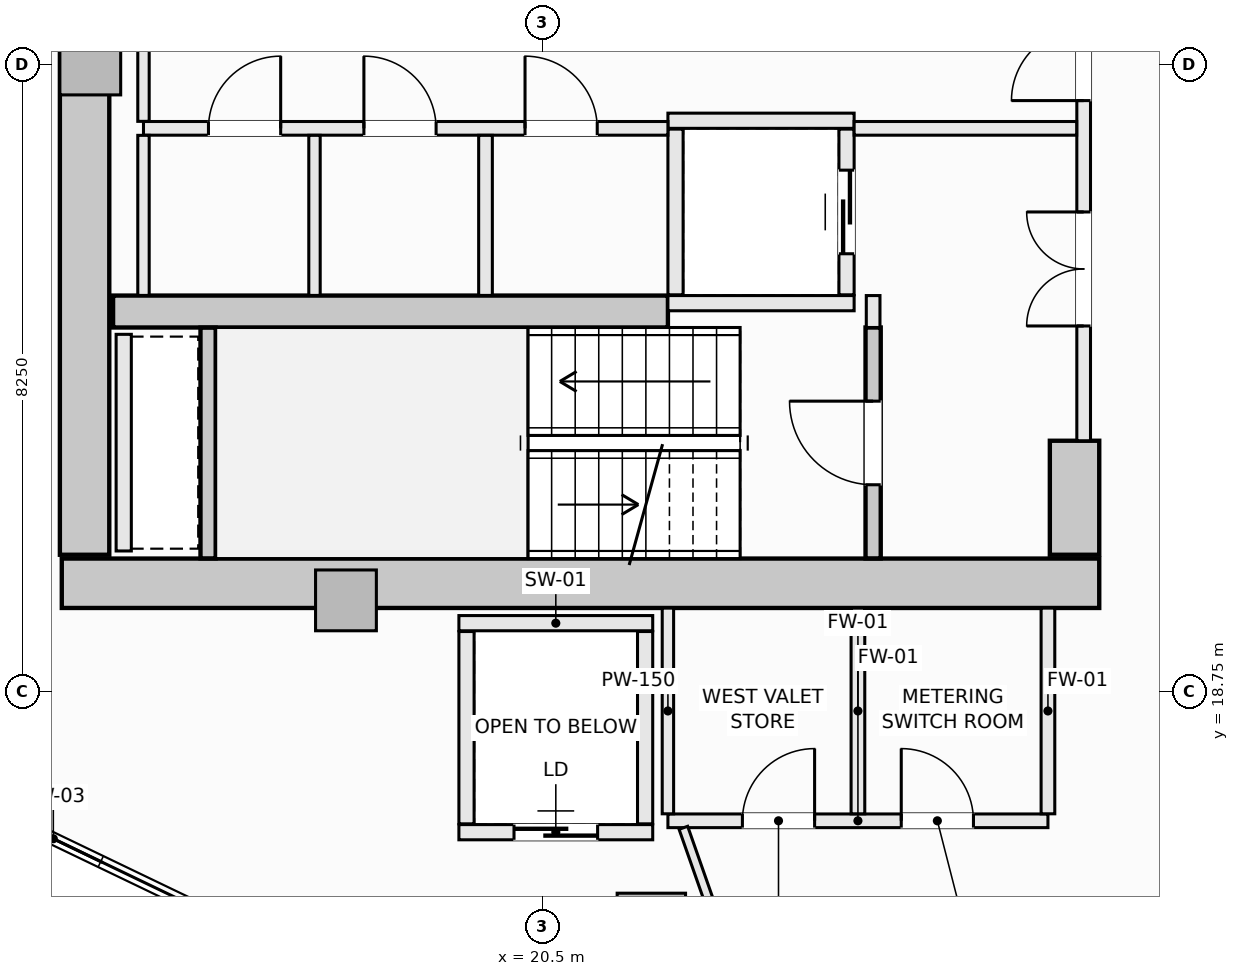
"""IFC4 building model, lengths in metres.
Left out: names, types, materials, properties, quantities, classifications, styles, units other than length and angle.
Written with IfcOpenShell. Run it as: python <this file> out.ifc"""

import sys

from ifc_helpers import new_model, si_unit, direction, frame, frame_2d, origin, origin_2d, place, context, subcontext, project, spatial, rectangle, extrude, element, fill, save


model = new_model("IFC4")
c1 = context("Model", 3, precision=1e-05, world=origin(), true_north=direction((0.0, 1.0)))
c2 = subcontext(c1, "Body", "Model", "MODEL_VIEW")
j1 = project(units=[si_unit("LENGTHUNIT", "METRE"), si_unit("PLANEANGLEUNIT", "RADIAN")], contexts=[c1])
p1 = place(None, origin())
s1 = spatial("IfcSite", under=j1, at=p1, CompositionType="ELEMENT")
p2 = place(p1, origin())
s2 = spatial("IfcBuilding", under=s1, at=p2, CompositionType="ELEMENT")
p3 = place(p2, frame((0.0, 0.0, 156.3)))
s3 = spatial("IfcBuildingStorey", under=s2, at=p3, CompositionType="ELEMENT", Elevation=156.3)
p4 = place(p3, frame((14.175, 20.175, -0.27), z_axis=(0.0, 0.0, 1.0), x_axis=(1.0, 0.0, 0.0)))
e1 = element("IfcWall", 1, at=p4, inside=s3, PredefinedType="SHEAR", context=c2, shape_type="SweptSolid", body=[
    extrude(rectangle(XDim=13.65, YDim=0.65, at=frame_2d((6.825, 0.0))), origin(), (0.0, 0.0, 1.0), 3.4),
])
p5 = place(p3, frame((14.475, 20.55, -0.27), z_axis=(0.0, 0.0, 1.0), x_axis=(0.0, 1.0, 0.0)))
e2 = element("IfcWall", 2, at=p5, inside=s3, PredefinedType="SHEAR", context=c2, shape_type="SweptSolid", body=[
    extrude(rectangle(XDim=12.9, YDim=0.65, at=frame_2d((6.45, 0.0))), origin(), (0.0, 0.0, 1.0), 3.4),
])
p6 = place(p3, frame((27.5, 20.55, -0.27), z_axis=(0.0, 0.0, 1.0), x_axis=(0.0, 1.0, 0.0)))
e3 = element("IfcWall", 3, at=p6, inside=s3, PredefinedType="SHEAR", context=c2, shape_type="SweptSolid", body=[
    extrude(rectangle(XDim=1.5, YDim=0.65, at=frame_2d((0.75, 0.0))), origin(), (0.0, 0.0, 1.0), 3.4),
])
p7 = place(p3, frame((14.85, 23.75, -0.27), z_axis=(0.0, 0.0, 1.0), x_axis=(1.0, 0.0, 0.0)))
e4 = element("IfcWall", 4, at=p7, inside=s3, PredefinedType="SHEAR", context=c2, shape_type="SweptSolid", body=[
    extrude(rectangle(XDim=7.3, YDim=0.42, at=frame_2d((3.65, 0.0))), origin(), (0.0, 0.0, 1.0), 3.4),
])
p8 = place(p3, frame((21.932, 15.648, -0.27), z_axis=(0.0, 0.0, 1.0), x_axis=(1.0, 0.0, 0.0)))
e5 = element("IfcColumn", 5, at=p8, inside=s3, PredefinedType="COLUMN", context=c2, shape_type="SweptSolid", body=[
    extrude(rectangle(XDim=0.9, YDim=0.9, at=origin_2d()), origin(), (0.0, 0.0, 1.0), 3.4),
])
for number, where, z_axis, x_axis in (
    (6, (14.55, 27.0, -0.27), (0.0, 0.0, 1.0), (1.0, 0.0, 0.0)),
    (7, (17.914, 19.95, -0.27), (0.0, 0.0, 1.0), (1.0, 0.0, 0.0)),
):
    element("IfcColumn", number, at=place(p3, frame(where, z_axis=z_axis, x_axis=x_axis)), inside=s3, PredefinedType="PILASTER", context=c2, shape_type="SweptSolid", body=[
        extrude(rectangle(XDim=0.8, YDim=0.8, at=origin_2d()), origin(), (0.0, 0.0, 1.0), 3.4),
    ])
p9 = place(p3, frame((24.85, 20.502, -0.27), z_axis=(0.0, 0.0, 1.0), x_axis=(0.0, 1.0, 0.0)))
e8 = element("IfcWall", 8, at=p9, inside=s3, PredefinedType="SHEAR", context=c2, shape_type="SweptSolid", body=[
    extrude(rectangle(XDim=3.038, YDim=0.2, at=frame_2d((1.519, 0.0))), origin(), (0.0, 0.0, 1.0), 3.4),
])
p10 = place(p9, frame((0.969, 0.0, 0.27)))
e9 = element("IfcOpeningElement", 9, at=p10, cuts=e8, PredefinedType="OPENING", context=c2, shape_type="SweptSolid", body=[
    extrude(rectangle(XDim=1.1, YDim=2.15, at=frame_2d((0.55, 1.075))), frame((0.0, 0.11, 0.0), z_axis=(0.0, -1.0, 0.0), x_axis=(1.0, 0.0, 0.0)), (0.0, 0.0, 1.0), 0.22),
])
p11 = place(p3, frame((16.1, 20.502, -0.27), z_axis=(0.0, 0.0, 1.0), x_axis=(0.0, 1.0, 0.0)))
e10 = element("IfcWall", 10, at=p11, inside=s3, PredefinedType="SHEAR", context=c2, shape_type="SweptSolid", body=[
    extrude(rectangle(XDim=3.036, YDim=0.2, at=frame_2d((1.518, 0.0))), origin(), (0.0, 0.0, 1.0), 3.4),
])
for number, where, z_axis, x_axis in (
    (11, (22.15, 26.26, 0.0), (0.0, 0.0, 1.0), (1.0, 0.0, 0.0)),
    (12, (22.15, 23.86, 0.0), (0.0, 0.0, 1.0), (1.0, 0.0, 0.0)),
):
    element("IfcWall", number, at=place(p3, frame(where, z_axis=z_axis, x_axis=x_axis)), inside=s3, PredefinedType="SOLIDWALL", context=c2, shape_type="SweptSolid", body=[
        extrude(rectangle(XDim=2.45, YDim=0.2, at=frame_2d((1.225, 0.0))), origin(), (0.0, 0.0, 1.0), 3.13),
    ])
p12 = place(p3, frame((22.25, 23.97, 0.0), z_axis=(0.0, 0.0, 1.0), x_axis=(0.0, 1.0, 0.0)))
e13 = element("IfcWall", 13, at=p12, inside=s3, PredefinedType="SOLIDWALL", context=c2, shape_type="SweptSolid", body=[
    extrude(rectangle(XDim=2.18, YDim=0.2, at=frame_2d((1.09, 0.0))), origin(), (0.0, 0.0, 1.0), 3.13),
])
p13 = place(p3, frame((24.5, 23.97, 0.0), z_axis=(0.0, 0.0, 1.0), x_axis=(0.0, 1.0, 0.0)))
e14 = element("IfcWall", 14, at=p13, inside=s3, PredefinedType="SOLIDWALL", context=c2, shape_type="SweptSolid", body=[
    extrude(rectangle(XDim=2.18, YDim=0.2, at=frame_2d((1.09, 0.0))), origin(), (0.0, 0.0, 1.0), 3.13),
])
p14 = place(p13, frame((0.54, 0.0, 0.0)))
e15 = element("IfcOpeningElement", 15, at=p14, cuts=e14, PredefinedType="OPENING", context=c2, shape_type="SweptSolid", body=[
    extrude(rectangle(XDim=1.1, YDim=2.2, at=frame_2d((0.55, 1.1))), frame((0.0, 0.11, 0.0), z_axis=(0.0, -1.0, 0.0), x_axis=(1.0, 0.0, 0.0)), (0.0, 0.0, 1.0), 0.22),
])
p15 = place(p3, frame((19.4, 19.65, 0.0), z_axis=(0.0, 0.0, 1.0), x_axis=(1.0, 0.0, 0.0)))
e16 = element("IfcWall", 16, at=p15, inside=s3, PredefinedType="SOLIDWALL", context=c2, shape_type="SweptSolid", body=[
    extrude(rectangle(XDim=2.55, YDim=0.2, at=frame_2d((1.275, 0.0))), origin(), (0.0, 0.0, 1.0), 3.13),
])
p16 = place(p3, frame((19.4, 16.9, 0.0), z_axis=(0.0, 0.0, 1.0), x_axis=(1.0, 0.0, 0.0)))
e17 = element("IfcWall", 17, at=p16, inside=s3, PredefinedType="SOLIDWALL", context=c2, shape_type="SweptSolid", body=[
    extrude(rectangle(XDim=2.55, YDim=0.2, at=frame_2d((1.275, 0.0))), origin(), (0.0, 0.0, 1.0), 3.13),
])
p17 = place(p16, frame((0.725, 0.0, 0.0)))
e18 = element("IfcOpeningElement", 18, at=p17, cuts=e17, PredefinedType="OPENING", context=c2, shape_type="SweptSolid", body=[
    extrude(rectangle(XDim=1.1, YDim=2.2, at=frame_2d((0.55, 1.1))), frame((0.0, 0.11, 0.0), z_axis=(0.0, -1.0, 0.0), x_axis=(1.0, 0.0, 0.0)), (0.0, 0.0, 1.0), 0.22),
])
for number, where, z_axis, x_axis in (
    (19, (19.5, 17.01, 0.0), (0.0, 0.0, 1.0), (0.0, 1.0, 0.0)),
    (20, (21.85, 17.01, 0.0), (0.0, 0.0, 1.0), (0.0, 1.0, 0.0)),
):
    element("IfcWall", number, at=place(p3, frame(where, z_axis=z_axis, x_axis=x_axis)), inside=s3, PredefinedType="SOLIDWALL", context=c2, shape_type="SweptSolid", body=[
        extrude(rectangle(XDim=2.53, YDim=0.2, at=frame_2d((1.265, 0.0))), origin(), (0.0, 0.0, 1.0), 3.13),
    ])
p18 = place(p3, frame((14.99, 20.6, 0.0), z_axis=(0.0, 0.0, 1.0), x_axis=(0.0, 1.0, 0.0)))
e21 = element("IfcWall", 21, at=p18, inside=s3, PredefinedType="SOLIDWALL", context=c2, shape_type="SweptSolid", body=[
    extrude(rectangle(XDim=2.85, YDim=0.2, at=frame_2d((1.425, 0.0))), origin(), (0.0, 0.0, 1.0), 3.13),
])
p19 = place(p3, frame((24.85, 23.54, 0.0), z_axis=(0.0, 0.0, 1.0), x_axis=(0.0, 1.0, 0.0)))
e22 = element("IfcWall", 22, at=p19, inside=s3, PredefinedType="SOLIDWALL", context=c2, shape_type="SweptSolid", body=[
    extrude(rectangle(XDim=0.42, YDim=0.18, at=frame_2d((0.21, 0.0))), origin(), (0.0, 0.0, 1.0), 3.13),
])
p20 = place(p3, frame((27.62, 22.05, 0.0), z_axis=(0.0, 0.0, 1.0), x_axis=(0.0, 1.0, 0.0)))
e23 = element("IfcWall", 23, at=p20, inside=s3, PredefinedType="SOLIDWALL", context=c2, shape_type="SweptSolid", body=[
    extrude(rectangle(XDim=9.9, YDim=0.18, at=frame_2d((4.95, 0.0))), origin(), (0.0, 0.0, 1.0), 3.13),
])
p21 = place(p20, frame((4.475, 0.0, 0.0)))
e24 = element("IfcOpeningElement", 24, at=p21, cuts=e23, PredefinedType="OPENING", context=c2, shape_type="SweptSolid", body=[
    extrude(rectangle(XDim=0.95, YDim=2.1, at=frame_2d((0.475, 1.05))), frame((0.0, 0.1, 0.0), z_axis=(0.0, -1.0, 0.0), x_axis=(1.0, 0.0, 0.0)), (0.0, 0.0, 1.0), 0.2),
])
p22 = place(p20, frame((6.89, 0.0, 0.0)))
e25 = element("IfcOpeningElement", 25, at=p22, cuts=e23, PredefinedType="OPENING", context=c2, shape_type="SweptSolid", body=[
    extrude(rectangle(XDim=1.5, YDim=2.2, at=frame_2d((0.75, 1.1))), frame((0.0, 0.1, 0.0), z_axis=(0.0, -1.0, 0.0), x_axis=(1.0, 0.0, 0.0)), (0.0, 0.0, 1.0), 0.2),
])
p23 = place(p20, frame((1.51, 0.0, 0.0)))
e26 = element("IfcOpeningElement", 26, at=p23, cuts=e23, PredefinedType="OPENING", context=c2, shape_type="SweptSolid", body=[
    extrude(rectangle(XDim=1.5, YDim=2.2, at=frame_2d((0.75, 1.1))), frame((0.0, 0.1, 0.0), z_axis=(0.0, -1.0, 0.0), x_axis=(1.0, 0.0, 0.0)), (0.0, 0.0, 1.0), 0.2),
])
p24 = place(p3, frame((15.25, 26.16, 0.0), z_axis=(0.0, 0.0, 1.0), x_axis=(1.0, 0.0, 0.0)))
e27 = element("IfcWall", 27, at=p24, inside=s3, PredefinedType="SOLIDWALL", context=c2, shape_type="SweptSolid", body=[
    extrude(rectangle(XDim=6.9, YDim=0.18, at=frame_2d((3.45, 0.0))), origin(), (0.0, 0.0, 1.0), 3.13),
])
p25 = place(p24, frame((5.02, 0.0, 0.0)))
e28 = element("IfcOpeningElement", 28, at=p25, cuts=e27, PredefinedType="OPENING", context=c2, shape_type="SweptSolid", body=[
    extrude(rectangle(XDim=0.95, YDim=2.1, at=frame_2d((0.475, 1.05))), frame((0.0, 0.1, 0.0), z_axis=(0.0, -1.0, 0.0), x_axis=(1.0, 0.0, 0.0)), (0.0, 0.0, 1.0), 0.2),
])
p26 = place(p24, frame((0.855, 0.0, 0.0)))
e29 = element("IfcOpeningElement", 29, at=p26, cuts=e27, PredefinedType="OPENING", context=c2, shape_type="SweptSolid", body=[
    extrude(rectangle(XDim=0.95, YDim=2.1, at=frame_2d((0.475, 1.05))), frame((0.0, 0.1, 0.0), z_axis=(0.0, -1.0, 0.0), x_axis=(1.0, 0.0, 0.0)), (0.0, 0.0, 1.0), 0.2),
])
p27 = place(p24, frame((2.9, 0.0, 0.0)))
e30 = element("IfcOpeningElement", 30, at=p27, cuts=e27, PredefinedType="OPENING", context=c2, shape_type="SweptSolid", body=[
    extrude(rectangle(XDim=0.95, YDim=2.1, at=frame_2d((0.475, 1.05))), frame((0.0, 0.1, 0.0), z_axis=(0.0, -1.0, 0.0), x_axis=(1.0, 0.0, 0.0)), (0.0, 0.0, 1.0), 0.2),
])
p28 = place(p3, frame((24.6, 26.16, 0.0), z_axis=(0.0, 0.0, 1.0), x_axis=(1.0, 0.0, 0.0)))
e31 = element("IfcWall", 31, at=p28, inside=s3, PredefinedType="SOLIDWALL", context=c2, shape_type="SweptSolid", body=[
    extrude(rectangle(XDim=2.928, YDim=0.18, at=frame_2d((1.464, 0.0))), origin(), (0.0, 0.0, 1.0), 3.13),
])
p29 = place(p3, frame((15.25, 23.962, 0.0), z_axis=(0.0, 0.0, 1.0), x_axis=(0.0, 1.0, 0.0)))
e32 = element("IfcWall", 32, at=p29, inside=s3, PredefinedType="PARTITIONING", context=c2, shape_type="SweptSolid", body=[
    extrude(rectangle(XDim=2.106, YDim=0.15, at=frame_2d((1.053, 0.0))), origin(), (0.0, 0.0, 1.0), 3.13),
])
p30 = place(p3, frame((15.25, 26.252, 0.0), z_axis=(0.0, 0.0, 1.0), x_axis=(0.0, 1.0, 0.0)))
e33 = element("IfcWall", 33, at=p30, inside=s3, PredefinedType="PARTITIONING", context=c2, shape_type="SweptSolid", body=[
    extrude(rectangle(XDim=1.496, YDim=0.15, at=frame_2d((0.748, 0.0))), origin(), (0.0, 0.0, 1.0), 3.13),
])
p31 = place(p3, frame((19.75, 23.962, 0.0), z_axis=(0.0, 0.0, 1.0), x_axis=(0.0, 1.0, 0.0)))
e34 = element("IfcWall", 34, at=p31, inside=s3, PredefinedType="SOLIDWALL", context=c2, shape_type="SweptSolid", body=[
    extrude(rectangle(XDim=2.106, YDim=0.18, at=frame_2d((1.053, 0.0))), origin(), (0.0, 0.0, 1.0), 3.13),
])
p32 = place(p3, frame((17.5, 23.962, 0.0), z_axis=(0.0, 0.0, 1.0), x_axis=(0.0, 1.0, 0.0)))
e35 = element("IfcWall", 35, at=p32, inside=s3, PredefinedType="PARTITIONING", context=c2, shape_type="SweptSolid", body=[
    extrude(rectangle(XDim=2.106, YDim=0.15, at=frame_2d((1.053, 0.0))), origin(), (0.0, 0.0, 1.0), 3.13),
])
p33 = place(p3, frame((22.15, 17.05, 0.0), z_axis=(0.0, 0.0, 1.0), x_axis=(1.0, 0.0, 0.0)))
e36 = element("IfcWall", 36, at=p33, inside=s3, PredefinedType="SOLIDWALL", context=c2, shape_type="SweptSolid", body=[
    extrude(rectangle(XDim=5.0, YDim=0.18, at=frame_2d((2.5, 0.0))), origin(), (0.0, 0.0, 1.0), 3.13),
])
p34 = place(p33, frame((0.98, 0.0, 0.0)))
e37 = element("IfcOpeningElement", 37, at=p34, cuts=e36, PredefinedType="OPENING", context=c2, shape_type="SweptSolid", body=[
    extrude(rectangle(XDim=0.95, YDim=2.1, at=frame_2d((0.475, 1.05))), frame((0.0, 0.1, 0.0), z_axis=(0.0, -1.0, 0.0), x_axis=(1.0, 0.0, 0.0)), (0.0, 0.0, 1.0), 0.2),
])
p35 = place(p33, frame((3.07, 0.0, 0.0)))
e38 = element("IfcOpeningElement", 38, at=p35, cuts=e36, PredefinedType="OPENING", context=c2, shape_type="SweptSolid", body=[
    extrude(rectangle(XDim=0.95, YDim=2.1, at=frame_2d((0.475, 1.05))), frame((0.0, 0.1, 0.0), z_axis=(0.0, -1.0, 0.0), x_axis=(1.0, 0.0, 0.0)), (0.0, 0.0, 1.0), 0.2),
])
p36 = place(p3, frame((22.15, 17.142, 0.0), z_axis=(0.0, 0.0, 1.0), x_axis=(0.0, 1.0, 0.0)))
e39 = element("IfcWall", 39, at=p36, inside=s3, PredefinedType="PARTITIONING", context=c2, shape_type="SweptSolid", body=[
    extrude(rectangle(XDim=2.706, YDim=0.15, at=frame_2d((1.353, 0.0))), origin(), (0.0, 0.0, 1.0), 3.13),
])
for number, where, z_axis, x_axis in (
    (40, (24.65, 17.142, 0.0), (0.0, 0.0, 1.0), (0.0, 1.0, 0.0)),
    (41, (27.15, 17.142, 0.0), (0.0, 0.0, 1.0), (0.0, 1.0, 0.0)),
):
    element("IfcWall", number, at=place(p3, frame(where, z_axis=z_axis, x_axis=x_axis)), inside=s3, PredefinedType="SOLIDWALL", context=c2, shape_type="SweptSolid", body=[
        extrude(rectangle(XDim=2.706, YDim=0.18, at=frame_2d((1.353, 0.0))), origin(), (0.0, 0.0, 1.0), 3.13),
    ])
p37 = place(p3, frame((22.353, 16.958, 0.0), z_axis=(0.0, 0.0, 1.0), x_axis=(0.331370038458, -0.943500873138, 0.0)))
e42 = element("IfcWall", 42, at=p37, inside=s3, PredefinedType="PARTITIONING", context=c2, shape_type="SweptSolid", body=[
    extrude(rectangle(XDim=1.216, YDim=0.12, at=frame_2d((0.608, 0.0))), origin(), (0.0, 0.0, 1.0), 3.13),
])
p38 = place(p10, origin())
e43 = element("IfcDoor", 43, at=p38, inside=s3, OperationType="SINGLE_SWING_RIGHT", PredefinedType="DOOR", context=c2, shape_type="SweptSolid", body=[
    extrude(rectangle(XDim=1.1, YDim=2.15, at=frame_2d((0.55, 1.075))), frame((0.0, 0.025, 0.0), z_axis=(0.0, -1.0, 0.0), x_axis=(1.0, 0.0, 0.0)), (0.0, 0.0, 1.0), 0.05),
])
fill(e9, e43)
p39 = place(p14, origin())
e44 = element("IfcDoor", 44, at=p39, inside=s3, OperationType="SLIDING_TO_LEFT", PredefinedType="DOOR", context=c2, shape_type="SweptSolid", body=[
    extrude(rectangle(XDim=1.1, YDim=2.2, at=frame_2d((0.55, 1.1))), frame((0.0, 0.025, 0.0), z_axis=(0.0, -1.0, 0.0), x_axis=(1.0, 0.0, 0.0)), (0.0, 0.0, 1.0), 0.05),
])
fill(e15, e44)
p40 = place(p17, origin())
e45 = element("IfcDoor", 45, at=p40, inside=s3, OperationType="SLIDING_TO_LEFT", PredefinedType="DOOR", context=c2, shape_type="SweptSolid", body=[
    extrude(rectangle(XDim=1.1, YDim=2.2, at=frame_2d((0.55, 1.1))), frame((0.0, 0.025, 0.0), z_axis=(0.0, -1.0, 0.0), x_axis=(1.0, 0.0, 0.0)), (0.0, 0.0, 1.0), 0.05),
])
fill(e18, e45)
p41 = place(p21, origin())
e46 = element("IfcDoor", 46, at=p41, inside=s3, OperationType="SINGLE_SWING_LEFT", PredefinedType="DOOR", context=c2, shape_type="SweptSolid", body=[
    extrude(rectangle(XDim=0.95, YDim=2.1, at=frame_2d((0.475, 1.05))), frame((0.0, 0.025, 0.0), z_axis=(0.0, -1.0, 0.0), x_axis=(1.0, 0.0, 0.0)), (0.0, 0.0, 1.0), 0.05),
])
fill(e24, e46)
p42 = place(p23, origin())
e47 = element("IfcDoor", 47, at=p42, inside=s3, OperationType="DOUBLE_DOOR_SINGLE_SWING", PredefinedType="DOOR", context=c2, shape_type="SweptSolid", body=[
    extrude(rectangle(XDim=1.5, YDim=2.2, at=frame_2d((0.75, 1.1))), frame((0.0, 0.025, 0.0), z_axis=(0.0, -1.0, 0.0), x_axis=(1.0, 0.0, 0.0)), (0.0, 0.0, 1.0), 0.05),
])
fill(e26, e47)
p43 = place(p25, origin())
e48 = element("IfcDoor", 48, at=p43, inside=s3, OperationType="SINGLE_SWING_LEFT", PredefinedType="DOOR", context=c2, shape_type="SweptSolid", body=[
    extrude(rectangle(XDim=0.95, YDim=2.1, at=frame_2d((0.475, 1.05))), frame((0.0, 0.025, 0.0), z_axis=(0.0, -1.0, 0.0), x_axis=(1.0, 0.0, 0.0)), (0.0, 0.0, 1.0), 0.05),
])
fill(e28, e48)
p44 = place(p26, origin())
e49 = element("IfcDoor", 49, at=p44, inside=s3, OperationType="SINGLE_SWING_RIGHT", PredefinedType="DOOR", context=c2, shape_type="SweptSolid", body=[
    extrude(rectangle(XDim=0.95, YDim=2.1, at=frame_2d((0.475, 1.05))), frame((0.0, 0.025, 0.0), z_axis=(0.0, -1.0, 0.0), x_axis=(1.0, 0.0, 0.0)), (0.0, 0.0, 1.0), 0.05),
])
fill(e29, e49)
p45 = place(p27, origin())
e50 = element("IfcDoor", 50, at=p45, inside=s3, OperationType="SINGLE_SWING_LEFT", PredefinedType="DOOR", context=c2, shape_type="SweptSolid", body=[
    extrude(rectangle(XDim=0.95, YDim=2.1, at=frame_2d((0.475, 1.05))), frame((0.0, 0.025, 0.0), z_axis=(0.0, -1.0, 0.0), x_axis=(1.0, 0.0, 0.0)), (0.0, 0.0, 1.0), 0.05),
])
fill(e30, e50)
p46 = place(p34, origin())
e51 = element("IfcDoor", 51, at=p46, inside=s3, OperationType="SINGLE_SWING_RIGHT", PredefinedType="DOOR", context=c2, shape_type="SweptSolid", body=[
    extrude(rectangle(XDim=0.95, YDim=2.1, at=frame_2d((0.475, 1.05))), frame((0.0, 0.025, 0.0), z_axis=(0.0, -1.0, 0.0), x_axis=(1.0, 0.0, 0.0)), (0.0, 0.0, 1.0), 0.05),
])
fill(e37, e51)
p47 = place(p35, origin())
e52 = element("IfcDoor", 52, at=p47, inside=s3, OperationType="SINGLE_SWING_LEFT", PredefinedType="DOOR", context=c2, shape_type="SweptSolid", body=[
    extrude(rectangle(XDim=0.95, YDim=2.1, at=frame_2d((0.475, 1.05))), frame((0.0, 0.025, 0.0), z_axis=(0.0, -1.0, 0.0), x_axis=(1.0, 0.0, 0.0)), (0.0, 0.0, 1.0), 0.05),
])
fill(e38, e52)
save(model, sys.argv[1])
